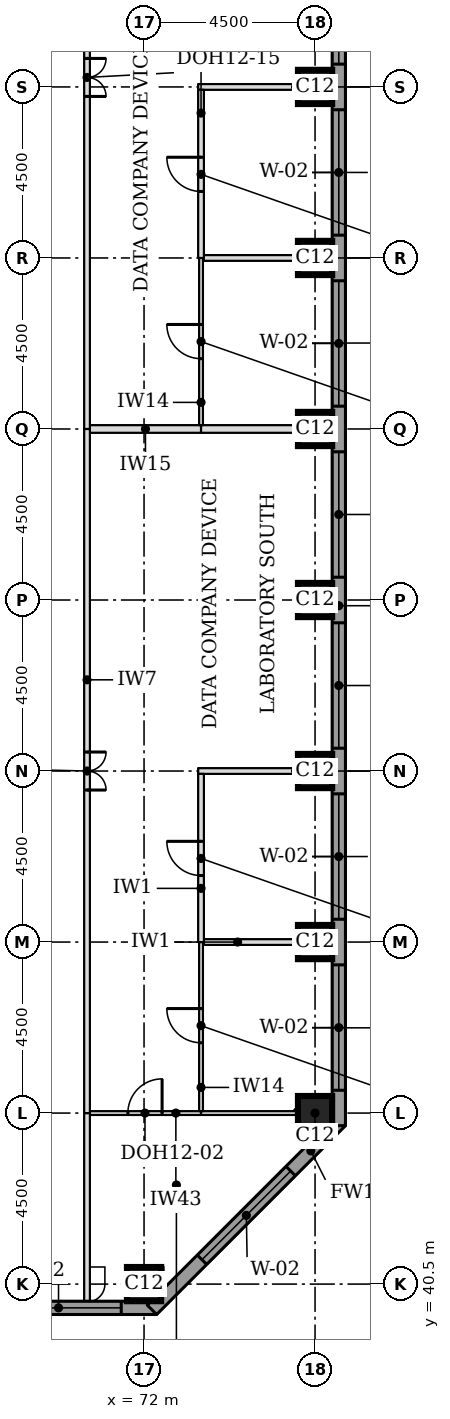
"""IFC4 building model, lengths in metres.
Left out: names, types, materials, properties, quantities, classifications, styles, units other than length and angle.
Written with IfcOpenShell. Run it as: python <this file> out.ifc"""

import sys

from ifc_helpers import new_model, si_unit, direction, frame, frame_2d, origin, origin_2d, place, context, subcontext, project, spatial, rectangle, extrude, element, fill, save


model = new_model("IFC4")
c1 = context("Model", 3, precision=1e-05, world=origin(), true_north=direction((0.0, 1.0)))
c2 = subcontext(c1, "Body", "Model", "MODEL_VIEW")
j1 = project(units=[si_unit("LENGTHUNIT", "METRE"), si_unit("PLANEANGLEUNIT", "RADIAN")], contexts=[c1])
p1 = place(None, origin())
s1 = spatial("IfcSite", under=j1, at=p1, CompositionType="ELEMENT")
p2 = place(p1, origin())
s2 = spatial("IfcBuilding", under=s1, at=p2, CompositionType="ELEMENT")
p3 = place(p2, frame((0.0, 0.0, 248.9)))
s3 = spatial("IfcBuildingStorey", under=s2, at=p3, CompositionType="ELEMENT", Elevation=248.9)
for number, where, z_axis, x_axis in (
    (1, (72.0, 40.5, 0.0), (0.0, 0.0, 1.0), (1.0, 0.0, 0.0)),
    (2, (76.5, 45.0, 0.0), (0.0, 0.0, 1.0), (1.0, 0.0, 0.0)),
    (3, (76.5, 49.5, 0.0), (0.0, 0.0, 1.0), (1.0, 0.0, 0.0)),
    (4, (76.5, 54.0, 0.0), (0.0, 0.0, 1.0), (1.0, 0.0, 0.0)),
    (5, (76.5, 58.5, 0.0), (0.0, 0.0, 1.0), (1.0, 0.0, 0.0)),
    (6, (76.5, 63.0, 0.0), (0.0, 0.0, 1.0), (1.0, 0.0, 0.0)),
    (7, (76.5, 67.5, 0.0), (0.0, 0.0, 1.0), (1.0, 0.0, 0.0)),
    (8, (76.5, 72.0, 0.0), (0.0, 0.0, 1.0), (1.0, 0.0, 0.0)),
):
    element("IfcColumn", number, at=place(p3, frame(where, z_axis=z_axis, x_axis=x_axis)), inside=s3, PredefinedType="COLUMN", context=c2, shape_type="SweptSolid", body=[
        extrude(rectangle(XDim=0.9, YDim=0.9, at=origin_2d()), origin(), (0.0, 0.0, 1.0), 3.7),
    ])
p4 = place(p3, frame((36.0, 39.875, 0.0), z_axis=(0.0, 0.0, 1.0), x_axis=(1.0, 0.0, 0.0)))
e9 = element("IfcWall", 9, at=p4, inside=s3, PredefinedType="STANDARD", context=c2, shape_type="SweptSolid", body=[
    extrude(rectangle(XDim=36.331, YDim=0.35, at=frame_2d((18.166, 0.0))), origin(), (0.0, 0.0, 1.0), 3.525),
])
p5 = place(p4, frame((0.6, 0.0, 0.9)))
e10 = element("IfcOpeningElement", 10, at=p5, cuts=e9, PredefinedType="OPENING", context=c2, shape_type="SweptSolid", body=[
    extrude(rectangle(XDim=3.3, YDim=1.9, at=frame_2d((1.65, 0.95))), frame((0.0, 0.185, 0.0), z_axis=(0.0, -1.0, 0.0), x_axis=(1.0, 0.0, 0.0)), (0.0, 0.0, 1.0), 0.37),
])
p6 = place(p4, frame((5.1, 0.0, 0.9)))
e11 = element("IfcOpeningElement", 11, at=p6, cuts=e9, PredefinedType="OPENING", context=c2, shape_type="SweptSolid", body=[
    extrude(rectangle(XDim=3.3, YDim=1.9, at=frame_2d((1.65, 0.95))), frame((0.0, 0.185, 0.0), z_axis=(0.0, -1.0, 0.0), x_axis=(1.0, 0.0, 0.0)), (0.0, 0.0, 1.0), 0.37),
])
p7 = place(p4, frame((9.6, 0.0, 0.9)))
e12 = element("IfcOpeningElement", 12, at=p7, cuts=e9, PredefinedType="OPENING", context=c2, shape_type="SweptSolid", body=[
    extrude(rectangle(XDim=3.3, YDim=1.9, at=frame_2d((1.65, 0.95))), frame((0.0, 0.185, 0.0), z_axis=(0.0, -1.0, 0.0), x_axis=(1.0, 0.0, 0.0)), (0.0, 0.0, 1.0), 0.37),
])
p8 = place(p4, frame((14.1, 0.0, 0.9)))
e13 = element("IfcOpeningElement", 13, at=p8, cuts=e9, PredefinedType="OPENING", context=c2, shape_type="SweptSolid", body=[
    extrude(rectangle(XDim=3.3, YDim=1.9, at=frame_2d((1.65, 0.95))), frame((0.0, 0.185, 0.0), z_axis=(0.0, -1.0, 0.0), x_axis=(1.0, 0.0, 0.0)), (0.0, 0.0, 1.0), 0.37),
])
p9 = place(p4, frame((18.6, 0.0, 0.9)))
e14 = element("IfcOpeningElement", 14, at=p9, cuts=e9, PredefinedType="OPENING", context=c2, shape_type="SweptSolid", body=[
    extrude(rectangle(XDim=3.3, YDim=1.9, at=frame_2d((1.65, 0.95))), frame((0.0, 0.185, 0.0), z_axis=(0.0, -1.0, 0.0), x_axis=(1.0, 0.0, 0.0)), (0.0, 0.0, 1.0), 0.37),
])
p10 = place(p4, frame((23.1, 0.0, 0.9)))
e15 = element("IfcOpeningElement", 15, at=p10, cuts=e9, PredefinedType="OPENING", context=c2, shape_type="SweptSolid", body=[
    extrude(rectangle(XDim=3.3, YDim=1.9, at=frame_2d((1.65, 0.95))), frame((0.0, 0.185, 0.0), z_axis=(0.0, -1.0, 0.0), x_axis=(1.0, 0.0, 0.0)), (0.0, 0.0, 1.0), 0.37),
])
p11 = place(p4, frame((27.6, 0.0, 0.9)))
e16 = element("IfcOpeningElement", 16, at=p11, cuts=e9, PredefinedType="OPENING", context=c2, shape_type="SweptSolid", body=[
    extrude(rectangle(XDim=3.3, YDim=1.9, at=frame_2d((1.65, 0.95))), frame((0.0, 0.185, 0.0), z_axis=(0.0, -1.0, 0.0), x_axis=(1.0, 0.0, 0.0)), (0.0, 0.0, 1.0), 0.37),
])
p12 = place(p4, frame((32.1, 0.0, 0.9)))
e17 = element("IfcOpeningElement", 17, at=p12, cuts=e9, PredefinedType="OPENING", context=c2, shape_type="SweptSolid", body=[
    extrude(rectangle(XDim=3.3, YDim=1.9, at=frame_2d((1.65, 0.95))), frame((0.0, 0.185, 0.0), z_axis=(0.0, -1.0, 0.0), x_axis=(1.0, 0.0, 0.0)), (0.0, 0.0, 1.0), 0.37),
])
p13 = place(p3, frame((72.208, 39.824, 0.0), z_axis=(0.0, 0.0, 1.0), x_axis=(0.707106781187, 0.707106781187, 0.0)))
e18 = element("IfcWall", 18, at=p13, inside=s3, PredefinedType="STANDARD", context=c2, shape_type="SweptSolid", body=[
    extrude(rectangle(XDim=7.027, YDim=0.35, at=frame_2d((3.513, 0.0))), origin(), (0.0, 0.0, 1.0), 3.525),
])
p14 = place(p13, frame((1.863, 0.0, 0.9)))
e19 = element("IfcOpeningElement", 19, at=p14, cuts=e18, PredefinedType="OPENING", context=c2, shape_type="SweptSolid", body=[
    extrude(rectangle(XDim=3.3, YDim=1.9, at=frame_2d((1.65, 0.95))), frame((0.0, 0.185, 0.0), z_axis=(0.0, -1.0, 0.0), x_axis=(1.0, 0.0, 0.0)), (0.0, 0.0, 1.0), 0.37),
])
p15 = place(p3, frame((77.125, 44.669, 0.0), z_axis=(0.0, 0.0, 1.0), x_axis=(0.0, 1.0, 0.0)))
e20 = element("IfcWall", 20, at=p15, inside=s3, PredefinedType="STANDARD", context=c2, shape_type="SweptSolid", body=[
    extrude(rectangle(XDim=32.163, YDim=0.35, at=frame_2d((16.081, 0.0))), origin(), (0.0, 0.0, 1.0), 3.525),
])
p16 = place(p15, frame((0.931, 0.0, 0.9)))
e21 = element("IfcOpeningElement", 21, at=p16, cuts=e20, PredefinedType="OPENING", context=c2, shape_type="SweptSolid", body=[
    extrude(rectangle(XDim=3.3, YDim=1.9, at=frame_2d((1.65, 0.95))), frame((0.0, 0.185, 0.0), z_axis=(0.0, -1.0, 0.0), x_axis=(1.0, 0.0, 0.0)), (0.0, 0.0, 1.0), 0.37),
])
p17 = place(p15, frame((5.431, 0.0, 0.9)))
e22 = element("IfcOpeningElement", 22, at=p17, cuts=e20, PredefinedType="OPENING", context=c2, shape_type="SweptSolid", body=[
    extrude(rectangle(XDim=3.3, YDim=1.9, at=frame_2d((1.65, 0.95))), frame((0.0, 0.185, 0.0), z_axis=(0.0, -1.0, 0.0), x_axis=(1.0, 0.0, 0.0)), (0.0, 0.0, 1.0), 0.37),
])
p18 = place(p15, frame((9.931, 0.0, 0.9)))
e23 = element("IfcOpeningElement", 23, at=p18, cuts=e20, PredefinedType="OPENING", context=c2, shape_type="SweptSolid", body=[
    extrude(rectangle(XDim=3.3, YDim=1.9, at=frame_2d((1.65, 0.95))), frame((0.0, 0.185, 0.0), z_axis=(0.0, -1.0, 0.0), x_axis=(1.0, 0.0, 0.0)), (0.0, 0.0, 1.0), 0.37),
])
p19 = place(p15, frame((14.431, 0.0, 0.9)))
e24 = element("IfcOpeningElement", 24, at=p19, cuts=e20, PredefinedType="OPENING", context=c2, shape_type="SweptSolid", body=[
    extrude(rectangle(XDim=3.3, YDim=1.9, at=frame_2d((1.65, 0.95))), frame((0.0, 0.185, 0.0), z_axis=(0.0, -1.0, 0.0), x_axis=(1.0, 0.0, 0.0)), (0.0, 0.0, 1.0), 0.37),
])
p20 = place(p15, frame((18.931, 0.0, 0.9)))
e25 = element("IfcOpeningElement", 25, at=p20, cuts=e20, PredefinedType="OPENING", context=c2, shape_type="SweptSolid", body=[
    extrude(rectangle(XDim=3.3, YDim=1.9, at=frame_2d((1.65, 0.95))), frame((0.0, 0.185, 0.0), z_axis=(0.0, -1.0, 0.0), x_axis=(1.0, 0.0, 0.0)), (0.0, 0.0, 1.0), 0.37),
])
p21 = place(p15, frame((23.431, 0.0, 0.9)))
e26 = element("IfcOpeningElement", 26, at=p21, cuts=e20, PredefinedType="OPENING", context=c2, shape_type="SweptSolid", body=[
    extrude(rectangle(XDim=3.3, YDim=1.9, at=frame_2d((1.65, 0.95))), frame((0.0, 0.185, 0.0), z_axis=(0.0, -1.0, 0.0), x_axis=(1.0, 0.0, 0.0)), (0.0, 0.0, 1.0), 0.37),
])
p22 = place(p15, frame((27.931, 0.0, 0.9)))
e27 = element("IfcOpeningElement", 27, at=p22, cuts=e20, PredefinedType="OPENING", context=c2, shape_type="SweptSolid", body=[
    extrude(rectangle(XDim=3.3, YDim=1.9, at=frame_2d((1.65, 0.95))), frame((0.0, 0.185, 0.0), z_axis=(0.0, -1.0, 0.0), x_axis=(1.0, 0.0, 0.0)), (0.0, 0.0, 1.0), 0.37),
])
p23 = place(p3, frame((70.575, 45.0, 0.0), z_axis=(0.0, 0.0, 1.0), x_axis=(1.0, 0.0, 0.0)))
e28 = element("IfcWall", 28, at=p23, inside=s3, PredefinedType="PARTITIONING", context=c2, shape_type="SweptSolid", body=[
    extrude(rectangle(XDim=2.925, YDim=0.1, at=frame_2d((1.462, 0.0))), origin(), (0.0, 0.0, 1.0), 3.096),
])
p24 = place(p23, frame((1.0, 0.0, 0.0)))
e29 = element("IfcOpeningElement", 29, at=p24, cuts=e28, PredefinedType="OPENING", context=c2, shape_type="SweptSolid", body=[
    extrude(rectangle(XDim=0.9, YDim=2.1, at=frame_2d((0.45, 1.05))), frame((0.0, 0.06, 0.0), z_axis=(0.0, -1.0, 0.0), x_axis=(1.0, 0.0, 0.0)), (0.0, 0.0, 1.0), 0.12),
])
p25 = place(p3, frame((73.5, 45.0, 0.0), z_axis=(0.0, 0.0, 1.0), x_axis=(1.0, 0.0, 0.0)))
e30 = element("IfcWall", 30, at=p25, inside=s3, PredefinedType="PARTITIONING", context=c2, shape_type="SweptSolid", body=[
    extrude(rectangle(XDim=2.55, YDim=0.1, at=frame_2d((1.275, 0.0))), origin(), (0.0, 0.0, 1.0), 3.096),
])
p26 = place(p3, frame((73.575, 49.5, 0.0), z_axis=(0.0, 0.0, 1.0), x_axis=(1.0, 0.0, 0.0)))
e31 = element("IfcWall", 31, at=p26, inside=s3, PredefinedType="PARTITIONING", context=c2, shape_type="SweptSolid", body=[
    extrude(rectangle(XDim=3.375, YDim=0.15, at=frame_2d((1.688, 0.0))), origin(), (0.0, 0.0, 1.0), 3.55),
])
p27 = place(p3, frame((73.425, 54.0, 0.0), z_axis=(0.0, 0.0, 1.0), x_axis=(1.0, 0.0, 0.0)))
e32 = element("IfcWall", 32, at=p27, inside=s3, PredefinedType="PARTITIONING", context=c2, shape_type="SweptSolid", body=[
    extrude(rectangle(XDim=3.525, YDim=0.15, at=frame_2d((1.762, 0.0))), origin(), (0.0, 0.0, 1.0), 3.55),
])
p28 = place(p3, frame((70.575, 63.0, 0.0), z_axis=(0.0, 0.0, 1.0), x_axis=(1.0, 0.0, 0.0)))
e33 = element("IfcWall", 33, at=p28, inside=s3, PredefinedType="PARTITIONING", context=c2, shape_type="SweptSolid", body=[
    extrude(rectangle(XDim=2.925, YDim=0.2, at=frame_2d((1.462, 0.0))), origin(), (0.0, 0.0, 1.0), 3.55),
])
p29 = place(p3, frame((73.5, 63.0, 0.0), z_axis=(0.0, 0.0, 1.0), x_axis=(1.0, 0.0, 0.0)))
e34 = element("IfcWall", 34, at=p29, inside=s3, PredefinedType="PARTITIONING", context=c2, shape_type="SweptSolid", body=[
    extrude(rectangle(XDim=3.45, YDim=0.2, at=frame_2d((1.725, 0.0))), origin(), (0.0, 0.0, 1.0), 3.55),
])
p30 = place(p3, frame((73.575, 67.5, 0.0), z_axis=(0.0, 0.0, 1.0), x_axis=(1.0, 0.0, 0.0)))
e35 = element("IfcWall", 35, at=p30, inside=s3, PredefinedType="PARTITIONING", context=c2, shape_type="SweptSolid", body=[
    extrude(rectangle(XDim=3.375, YDim=0.15, at=frame_2d((1.688, 0.0))), origin(), (0.0, 0.0, 1.0), 3.55),
])
p31 = place(p3, frame((73.425, 72.0, 0.0), z_axis=(0.0, 0.0, 1.0), x_axis=(1.0, 0.0, 0.0)))
e36 = element("IfcWall", 36, at=p31, inside=s3, PredefinedType="PARTITIONING", context=c2, shape_type="SweptSolid", body=[
    extrude(rectangle(XDim=3.525, YDim=0.15, at=frame_2d((1.762, 0.0))), origin(), (0.0, 0.0, 1.0), 3.55),
])
p32 = place(p3, frame((70.5, 40.05, 0.0), z_axis=(0.0, 0.0, 1.0), x_axis=(0.0, 1.0, 0.0)))
e37 = element("IfcWall", 37, at=p32, inside=s3, PredefinedType="PARTITIONING", context=c2, shape_type="SweptSolid", body=[
    extrude(rectangle(XDim=4.95, YDim=0.15, at=frame_2d((2.475, 0.0))), origin(), (0.0, 0.0, 1.0), 3.55),
])
p33 = place(p3, frame((70.5, 45.0, 0.0), z_axis=(0.0, 0.0, 1.0), x_axis=(0.0, 1.0, 0.0)))
e38 = element("IfcWall", 38, at=p33, inside=s3, PredefinedType="PARTITIONING", context=c2, shape_type="SweptSolid", body=[
    extrude(rectangle(XDim=18.0, YDim=0.15, at=frame_2d((9.0, 0.0))), origin(), (0.0, 0.0, 1.0), 3.55),
])
p34 = place(p33, frame((8.5, 0.0, 0.0)))
e39 = element("IfcOpeningElement", 39, at=p34, cuts=e38, PredefinedType="OPENING", context=c2, shape_type="SweptSolid", body=[
    extrude(rectangle(XDim=1.0, YDim=2.1, at=frame_2d((0.5, 1.05))), frame((0.0, 0.085, 0.0), z_axis=(0.0, -1.0, 0.0), x_axis=(1.0, 0.0, 0.0)), (0.0, 0.0, 1.0), 0.17),
])
p35 = place(p3, frame((73.5, 45.05, 0.0), z_axis=(0.0, 0.0, 1.0), x_axis=(0.0, 1.0, 0.0)))
e40 = element("IfcWall", 40, at=p35, inside=s3, PredefinedType="PARTITIONING", context=c2, shape_type="SweptSolid", body=[
    extrude(rectangle(XDim=4.45, YDim=0.1, at=frame_2d((2.225, 0.0))), origin(), (0.0, 0.0, 1.0), 3.55),
])
p36 = place(p35, frame((1.8, 0.0, 0.0)))
e41 = element("IfcOpeningElement", 41, at=p36, cuts=e40, PredefinedType="OPENING", context=c2, shape_type="SweptSolid", body=[
    extrude(rectangle(XDim=0.9, YDim=2.1, at=frame_2d((0.45, 1.05))), frame((0.0, 0.06, 0.0), z_axis=(0.0, -1.0, 0.0), x_axis=(1.0, 0.0, 0.0)), (0.0, 0.0, 1.0), 0.12),
])
p37 = place(p3, frame((73.5, 49.5, 0.0), z_axis=(0.0, 0.0, 1.0), x_axis=(0.0, 1.0, 0.0)))
e42 = element("IfcWall", 42, at=p37, inside=s3, PredefinedType="PARTITIONING", context=c2, shape_type="SweptSolid", body=[
    extrude(rectangle(XDim=4.425, YDim=0.15, at=frame_2d((2.212, 0.0))), origin(), (0.0, 0.0, 1.0), 3.55),
])
p38 = place(p37, frame((1.75, 0.0, 0.0)))
e43 = element("IfcOpeningElement", 43, at=p38, cuts=e42, PredefinedType="OPENING", context=c2, shape_type="SweptSolid", body=[
    extrude(rectangle(XDim=0.9, YDim=2.1, at=frame_2d((0.45, 1.05))), frame((0.0, 0.085, 0.0), z_axis=(0.0, -1.0, 0.0), x_axis=(1.0, 0.0, 0.0)), (0.0, 0.0, 1.0), 0.17),
])
p39 = place(p3, frame((70.5, 63.0, 0.0), z_axis=(0.0, 0.0, 1.0), x_axis=(0.0, 1.0, 0.0)))
e44 = element("IfcWall", 44, at=p39, inside=s3, PredefinedType="PARTITIONING", context=c2, shape_type="SweptSolid", body=[
    extrude(rectangle(XDim=18.45, YDim=0.15, at=frame_2d((9.225, 0.0))), origin(), (0.0, 0.0, 1.0), 3.55),
])
p40 = place(p39, frame((8.75, 0.0, 0.0)))
e45 = element("IfcOpeningElement", 45, at=p40, cuts=e44, PredefinedType="OPENING", context=c2, shape_type="SweptSolid", body=[
    extrude(rectangle(XDim=1.0, YDim=2.1, at=frame_2d((0.5, 1.05))), frame((0.0, 0.085, 0.0), z_axis=(0.0, -1.0, 0.0), x_axis=(1.0, 0.0, 0.0)), (0.0, 0.0, 1.0), 0.17),
])
p41 = place(p3, frame((73.5, 63.1, 0.0), z_axis=(0.0, 0.0, 1.0), x_axis=(0.0, 1.0, 0.0)))
e46 = element("IfcWall", 46, at=p41, inside=s3, PredefinedType="PARTITIONING", context=c2, shape_type="SweptSolid", body=[
    extrude(rectangle(XDim=4.4, YDim=0.1, at=frame_2d((2.2, 0.0))), origin(), (0.0, 0.0, 1.0), 3.55),
])
p42 = place(p41, frame((1.75, 0.0, 0.0)))
e47 = element("IfcOpeningElement", 47, at=p42, cuts=e46, PredefinedType="OPENING", context=c2, shape_type="SweptSolid", body=[
    extrude(rectangle(XDim=0.9, YDim=2.1, at=frame_2d((0.45, 1.05))), frame((0.0, 0.06, 0.0), z_axis=(0.0, -1.0, 0.0), x_axis=(1.0, 0.0, 0.0)), (0.0, 0.0, 1.0), 0.12),
])
p43 = place(p3, frame((73.5, 67.5, 0.0), z_axis=(0.0, 0.0, 1.0), x_axis=(0.0, 1.0, 0.0)))
e48 = element("IfcWall", 48, at=p43, inside=s3, PredefinedType="PARTITIONING", context=c2, shape_type="SweptSolid", body=[
    extrude(rectangle(XDim=4.425, YDim=0.15, at=frame_2d((2.212, 0.0))), origin(), (0.0, 0.0, 1.0), 3.55),
])
p44 = place(p43, frame((1.75, 0.0, 0.0)))
e49 = element("IfcOpeningElement", 49, at=p44, cuts=e48, PredefinedType="OPENING", context=c2, shape_type="SweptSolid", body=[
    extrude(rectangle(XDim=0.9, YDim=2.1, at=frame_2d((0.45, 1.05))), frame((0.0, 0.085, 0.0), z_axis=(0.0, -1.0, 0.0), x_axis=(1.0, 0.0, 0.0)), (0.0, 0.0, 1.0), 0.17),
])
p45 = place(p12, origin())
e50 = element("IfcWindow", 50, at=p45, inside=s3, PartitioningType="SINGLE_PANEL", PredefinedType="WINDOW", context=c2, shape_type="SweptSolid", body=[
    extrude(rectangle(XDim=3.3, YDim=1.9, at=frame_2d((1.65, 0.95))), frame((0.0, 0.085, 0.0), z_axis=(0.0, -1.0, 0.0), x_axis=(1.0, 0.0, 0.0)), (0.0, 0.0, 1.0), 0.06),
])
fill(e17, e50)
p46 = place(p14, origin())
e51 = element("IfcWindow", 51, at=p46, inside=s3, PartitioningType="SINGLE_PANEL", PredefinedType="WINDOW", context=c2, shape_type="SweptSolid", body=[
    extrude(rectangle(XDim=3.3, YDim=1.9, at=frame_2d((1.65, 0.95))), frame((0.0, 0.085, 0.0), z_axis=(0.0, -1.0, 0.0), x_axis=(1.0, 0.0, 0.0)), (0.0, 0.0, 1.0), 0.06),
])
fill(e19, e51)
p47 = place(p16, origin())
e52 = element("IfcWindow", 52, at=p47, inside=s3, PartitioningType="SINGLE_PANEL", PredefinedType="WINDOW", context=c2, shape_type="SweptSolid", body=[
    extrude(rectangle(XDim=3.3, YDim=1.9, at=frame_2d((1.65, 0.95))), frame((0.0, 0.085, 0.0), z_axis=(0.0, -1.0, 0.0), x_axis=(1.0, 0.0, 0.0)), (0.0, 0.0, 1.0), 0.06),
])
fill(e21, e52)
p48 = place(p17, origin())
e53 = element("IfcWindow", 53, at=p48, inside=s3, PartitioningType="SINGLE_PANEL", PredefinedType="WINDOW", context=c2, shape_type="SweptSolid", body=[
    extrude(rectangle(XDim=3.3, YDim=1.9, at=frame_2d((1.65, 0.95))), frame((0.0, 0.085, 0.0), z_axis=(0.0, -1.0, 0.0), x_axis=(1.0, 0.0, 0.0)), (0.0, 0.0, 1.0), 0.06),
])
fill(e22, e53)
p49 = place(p18, origin())
e54 = element("IfcWindow", 54, at=p49, inside=s3, PartitioningType="SINGLE_PANEL", PredefinedType="WINDOW", context=c2, shape_type="SweptSolid", body=[
    extrude(rectangle(XDim=3.3, YDim=1.9, at=frame_2d((1.65, 0.95))), frame((0.0, 0.085, 0.0), z_axis=(0.0, -1.0, 0.0), x_axis=(1.0, 0.0, 0.0)), (0.0, 0.0, 1.0), 0.06),
])
fill(e23, e54)
p50 = place(p19, origin())
e55 = element("IfcWindow", 55, at=p50, inside=s3, PartitioningType="SINGLE_PANEL", PredefinedType="WINDOW", context=c2, shape_type="SweptSolid", body=[
    extrude(rectangle(XDim=3.3, YDim=1.9, at=frame_2d((1.65, 0.95))), frame((0.0, 0.085, 0.0), z_axis=(0.0, -1.0, 0.0), x_axis=(1.0, 0.0, 0.0)), (0.0, 0.0, 1.0), 0.06),
])
fill(e24, e55)
p51 = place(p20, origin())
e56 = element("IfcWindow", 56, at=p51, inside=s3, PartitioningType="SINGLE_PANEL", PredefinedType="WINDOW", context=c2, shape_type="SweptSolid", body=[
    extrude(rectangle(XDim=3.3, YDim=1.9, at=frame_2d((1.65, 0.95))), frame((0.0, 0.085, 0.0), z_axis=(0.0, -1.0, 0.0), x_axis=(1.0, 0.0, 0.0)), (0.0, 0.0, 1.0), 0.06),
])
fill(e25, e56)
p52 = place(p21, origin())
e57 = element("IfcWindow", 57, at=p52, inside=s3, PartitioningType="SINGLE_PANEL", PredefinedType="WINDOW", context=c2, shape_type="SweptSolid", body=[
    extrude(rectangle(XDim=3.3, YDim=1.9, at=frame_2d((1.65, 0.95))), frame((0.0, 0.085, 0.0), z_axis=(0.0, -1.0, 0.0), x_axis=(1.0, 0.0, 0.0)), (0.0, 0.0, 1.0), 0.06),
])
fill(e26, e57)
p53 = place(p22, origin())
e58 = element("IfcWindow", 58, at=p53, inside=s3, PartitioningType="SINGLE_PANEL", PredefinedType="WINDOW", context=c2, shape_type="SweptSolid", body=[
    extrude(rectangle(XDim=3.3, YDim=1.9, at=frame_2d((1.65, 0.95))), frame((0.0, 0.085, 0.0), z_axis=(0.0, -1.0, 0.0), x_axis=(1.0, 0.0, 0.0)), (0.0, 0.0, 1.0), 0.06),
])
fill(e27, e58)
p54 = place(p34, frame((1.0, 0.0, 0.0), z_axis=(0.0, 0.0, 1.0), x_axis=(-1.0, 0.0, 0.0)))
e59 = element("IfcDoor", 59, at=p54, inside=s3, OperationType="DOUBLE_DOOR_SINGLE_SWING", PredefinedType="DOOR", context=c2, shape_type="SweptSolid", body=[
    extrude(rectangle(XDim=1.0, YDim=2.1, at=frame_2d((0.5, 1.05))), frame((0.0, 0.025, 0.0), z_axis=(0.0, -1.0, 0.0), x_axis=(1.0, 0.0, 0.0)), (0.0, 0.0, 1.0), 0.05),
])
fill(e39, e59)
p55 = place(p24, origin())
e60 = element("IfcDoor", 60, at=p55, inside=s3, OperationType="SINGLE_SWING_RIGHT", PredefinedType="DOOR", context=c2, shape_type="SweptSolid", body=[
    extrude(rectangle(XDim=0.9, YDim=2.1, at=frame_2d((0.45, 1.05))), frame((0.0, 0.025, 0.0), z_axis=(0.0, -1.0, 0.0), x_axis=(1.0, 0.0, 0.0)), (0.0, 0.0, 1.0), 0.05),
])
fill(e29, e60)
p56 = place(p36, origin())
e61 = element("IfcDoor", 61, at=p56, inside=s3, OperationType="SINGLE_SWING_RIGHT", PredefinedType="DOOR", context=c2, shape_type="SweptSolid", body=[
    extrude(rectangle(XDim=0.9, YDim=2.1, at=frame_2d((0.45, 1.05))), frame((0.0, 0.025, 0.0), z_axis=(0.0, -1.0, 0.0), x_axis=(1.0, 0.0, 0.0)), (0.0, 0.0, 1.0), 0.05),
])
fill(e41, e61)
p57 = place(p38, origin())
e62 = element("IfcDoor", 62, at=p57, inside=s3, OperationType="SINGLE_SWING_RIGHT", PredefinedType="DOOR", context=c2, shape_type="SweptSolid", body=[
    extrude(rectangle(XDim=0.9, YDim=2.1, at=frame_2d((0.45, 1.05))), frame((0.0, 0.025, 0.0), z_axis=(0.0, -1.0, 0.0), x_axis=(1.0, 0.0, 0.0)), (0.0, 0.0, 1.0), 0.05),
])
fill(e43, e62)
p58 = place(p40, frame((1.0, 0.0, 0.0), z_axis=(0.0, 0.0, 1.0), x_axis=(-1.0, 0.0, 0.0)))
e63 = element("IfcDoor", 63, at=p58, inside=s3, OperationType="DOUBLE_DOOR_SINGLE_SWING", PredefinedType="DOOR", context=c2, shape_type="SweptSolid", body=[
    extrude(rectangle(XDim=1.0, YDim=2.1, at=frame_2d((0.5, 1.05))), frame((0.0, 0.025, 0.0), z_axis=(0.0, -1.0, 0.0), x_axis=(1.0, 0.0, 0.0)), (0.0, 0.0, 1.0), 0.05),
])
fill(e45, e63)
p59 = place(p42, origin())
e64 = element("IfcDoor", 64, at=p59, inside=s3, OperationType="SINGLE_SWING_RIGHT", PredefinedType="DOOR", context=c2, shape_type="SweptSolid", body=[
    extrude(rectangle(XDim=0.9, YDim=2.1, at=frame_2d((0.45, 1.05))), frame((0.0, 0.025, 0.0), z_axis=(0.0, -1.0, 0.0), x_axis=(1.0, 0.0, 0.0)), (0.0, 0.0, 1.0), 0.05),
])
fill(e47, e64)
p60 = place(p44, origin())
e65 = element("IfcDoor", 65, at=p60, inside=s3, OperationType="SINGLE_SWING_RIGHT", PredefinedType="DOOR", context=c2, shape_type="SweptSolid", body=[
    extrude(rectangle(XDim=0.9, YDim=2.1, at=frame_2d((0.45, 1.05))), frame((0.0, 0.025, 0.0), z_axis=(0.0, -1.0, 0.0), x_axis=(1.0, 0.0, 0.0)), (0.0, 0.0, 1.0), 0.05),
])
fill(e49, e65)
save(model, sys.argv[1])
